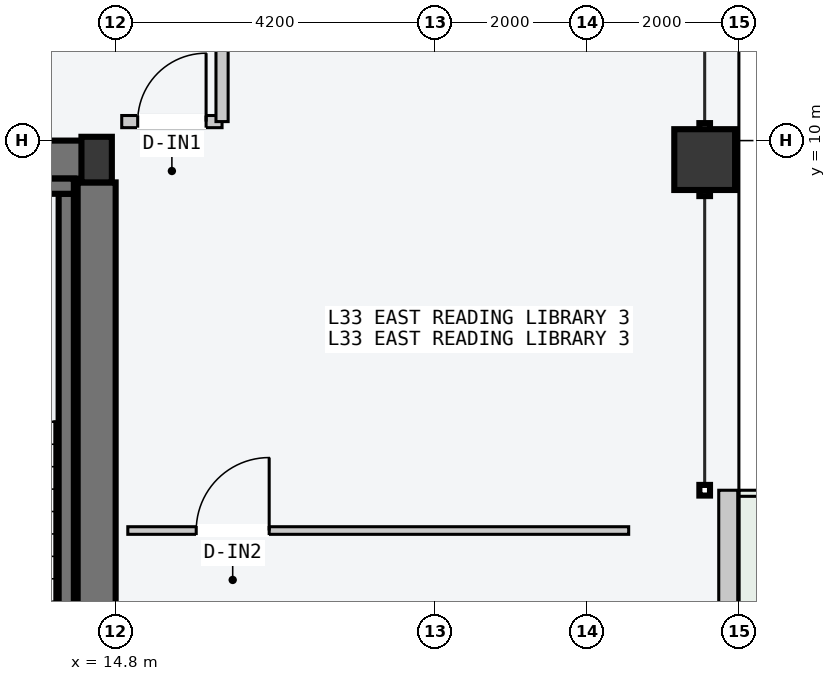
"""IFC4 building model, lengths in metres.
Left out: names, types, materials, properties, quantities, classifications, styles, units other than length and angle.
Written with IfcOpenShell. Run it as: python <this file> out.ifc"""

import sys

from ifc_helpers import new_model, si_unit, direction, frame, frame_2d, origin, origin_2d, place, context, subcontext, project, spatial, rectangle, hollow_rectangle, i_section, extrude, element, fill, save


model = new_model("IFC4")
c1 = context("Model", 3, precision=1e-05, world=origin(), true_north=direction((0.0, 1.0)))
c2 = subcontext(c1, "Body", "Model", "MODEL_VIEW")
j1 = project(units=[si_unit("LENGTHUNIT", "METRE"), si_unit("PLANEANGLEUNIT", "RADIAN")], contexts=[c1])
p1 = place(None, origin())
s1 = spatial("IfcSite", under=j1, at=p1, CompositionType="ELEMENT")
p2 = place(p1, origin())
s2 = spatial("IfcBuilding", under=s1, at=p2, CompositionType="ELEMENT")
p3 = place(p2, frame((0.0, 0.0, 127.8)))
s3 = spatial("IfcBuildingStorey", under=s2, at=p3, CompositionType="ELEMENT", Elevation=127.8)
p4 = place(p3, frame((8.07, 9.75, -0.2), z_axis=(0.0, 0.0, 1.0), x_axis=(1.0, 0.0, 0.0)))
e1 = element("IfcWall", 1, at=p4, inside=s3, PredefinedType="SHEAR", context=c2, shape_type="SweptSolid", body=[
    extrude(rectangle(XDim=6.46, YDim=0.5, at=frame_2d((3.23, 0.0))), origin(), (0.0, 0.0, 1.0), 3.6),
])
p5 = place(p3, frame((14.55, 0.3, -0.2), z_axis=(0.0, 0.0, 1.0), x_axis=(0.0, 1.0, 0.0)))
e2 = element("IfcWall", 2, at=p5, inside=s3, PredefinedType="SHEAR", context=c2, shape_type="SweptSolid", body=[
    extrude(rectangle(XDim=9.15, YDim=0.5, at=frame_2d((4.575, 0.0))), origin(), (0.0, 0.0, 1.0), 3.6),
])
p6 = place(p3, frame((14.15, 1.5, -0.2), z_axis=(0.0, 0.0, 1.0), x_axis=(0.0, 1.0, 0.0)))
e3 = element("IfcWall", 3, at=p6, inside=s3, PredefinedType="SOLIDWALL", context=c2, shape_type="SweptSolid", body=[
    extrude(rectangle(XDim=7.8, YDim=0.2, at=frame_2d((3.9, 0.0))), origin(), (0.0, 0.0, 1.0), 3.6),
])
p7 = place(p3, frame((10.15, 9.4, -0.2), z_axis=(0.0, 0.0, 1.0), x_axis=(1.0, 0.0, 0.0)))
e4 = element("IfcWall", 4, at=p7, inside=s3, PredefinedType="SOLIDWALL", context=c2, shape_type="SweptSolid", body=[
    extrude(rectangle(XDim=4.1, YDim=0.2, at=frame_2d((2.05, 0.0))), origin(), (0.0, 0.0, 1.0), 3.6),
])
p8 = place(p3, frame((14.55, 9.75, 0.0), z_axis=(0.0, 0.0, 1.0), x_axis=(1.0, 0.0, 0.0)))
e5 = element("IfcColumn", 5, at=p8, inside=s3, PredefinedType="COLUMN", context=c2, shape_type="SweptSolid", body=[
    extrude(i_section(OverallWidth=0.4, OverallDepth=0.6, WebThickness=0.022, FlangeThickness=0.036, at=origin_2d()), origin(), (0.0, 0.0, 1.0), 3.6),
])
p9 = place(p3, frame((22.55, 9.75, 0.0), z_axis=(0.0, 0.0, 1.0), x_axis=(0.0, 1.0, 0.0)))
e6 = element("IfcColumn", 6, at=p9, inside=s3, PredefinedType="COLUMN", context=c2, shape_type="SweptSolid", body=[
    extrude(hollow_rectangle(XDim=0.8, YDim=0.8, WallThickness=0.036, at=origin_2d()), origin(), (0.0, 0.0, 1.0), 3.6),
])
p10 = place(p3, frame((22.86, -5.4, 0.0), z_axis=(0.0, 0.0, 1.0), x_axis=(0.0, 1.0, 0.0)))
e7 = element("IfcWall", 7, at=p10, inside=s3, PredefinedType="STANDARD", context=c2, shape_type="SweptSolid", body=[
    extrude(rectangle(XDim=10.8, YDim=0.25, at=frame_2d((5.4, 0.0))), origin(), (0.0, 0.0, 1.0), 3.4),
])
p11 = place(p10, frame((7.2, 0.0, 0.0)))
e8 = element("IfcOpeningElement", 8, at=p11, cuts=e7, PredefinedType="OPENING", context=c2, shape_type="SweptSolid", body=[
    extrude(rectangle(XDim=1.6, YDim=2.2, at=frame_2d((0.8, 1.1))), frame((0.0, 0.135, 0.0), z_axis=(0.0, -1.0, 0.0), x_axis=(1.0, 0.0, 0.0)), (0.0, 0.0, 1.0), 0.27),
])
p12 = place(p10, frame((1.8, 0.0, 0.85)))
e9 = element("IfcOpeningElement", 9, at=p12, cuts=e7, PredefinedType="OPENING", context=c2, shape_type="SweptSolid", body=[
    extrude(rectangle(XDim=2.0, YDim=2.1, at=frame_2d((1.0, 1.05))), frame((0.0, 0.135, 0.0), z_axis=(0.0, -1.0, 0.0), x_axis=(1.0, 0.0, 0.0)), (0.0, 0.0, 1.0), 0.27),
])
p13 = place(p3, frame((14.88, 10.25, 0.0), z_axis=(0.0, 0.0, 1.0), x_axis=(1.0, 0.0, 0.0)))
e10 = element("IfcWall", 10, at=p13, inside=s3, PredefinedType="PARTITIONING", context=c2, shape_type="SweptSolid", body=[
    extrude(rectangle(XDim=1.32, YDim=0.16, at=frame_2d((0.66, 0.0))), origin(), (0.0, 0.0, 1.0), 3.4),
])
p14 = place(p13, frame((0.21, 0.0, 0.0)))
e11 = element("IfcOpeningElement", 11, at=p14, cuts=e10, PredefinedType="OPENING", context=c2, shape_type="SweptSolid", body=[
    extrude(rectangle(XDim=0.9, YDim=2.15, at=frame_2d((0.45, 1.075))), frame((0.0, 0.09, 0.0), z_axis=(0.0, -1.0, 0.0), x_axis=(1.0, 0.0, 0.0)), (0.0, 0.0, 1.0), 0.18),
])
p15 = place(p3, frame((16.2, 10.25, 0.0), z_axis=(0.0, 0.0, 1.0), x_axis=(0.0, 1.0, 0.0)))
e12 = element("IfcWall", 12, at=p15, inside=s3, PredefinedType="PARTITIONING", context=c2, shape_type="SweptSolid", body=[
    extrude(rectangle(XDim=1.95, YDim=0.16, at=frame_2d((0.975, 0.0))), origin(), (0.0, 0.0, 1.0), 3.4),
])
p16 = place(p3, frame((14.96, 4.87, 0.0), z_axis=(0.0, 0.0, 1.0), x_axis=(1.0, 0.0, 0.0)))
e13 = element("IfcWall", 13, at=p16, inside=s3, PredefinedType="PARTITIONING", context=c2, shape_type="SweptSolid", body=[
    extrude(rectangle(XDim=6.59, YDim=0.1, at=frame_2d((3.295, 0.0))), origin(), (0.0, 0.0, 1.0), 3.4),
])
p17 = place(p16, frame((0.9, 0.0, 0.0)))
e14 = element("IfcOpeningElement", 14, at=p17, cuts=e13, PredefinedType="OPENING", context=c2, shape_type="SweptSolid", body=[
    extrude(rectangle(XDim=0.96, YDim=2.18, at=frame_2d((0.48, 1.09))), frame((0.0, 0.06, 0.0), z_axis=(0.0, -1.0, 0.0), x_axis=(1.0, 0.0, 0.0)), (0.0, 0.0, 1.0), 0.12),
])
p18 = place(p14, origin())
e15 = element("IfcDoor", 15, at=p18, inside=s3, OperationType="SINGLE_SWING_RIGHT", PredefinedType="DOOR", context=c2, shape_type="SweptSolid", body=[
    extrude(rectangle(XDim=0.9, YDim=2.15, at=frame_2d((0.45, 1.075))), frame((0.0, 0.025, 0.0), z_axis=(0.0, -1.0, 0.0), x_axis=(1.0, 0.0, 0.0)), (0.0, 0.0, 1.0), 0.05),
])
fill(e11, e15)
p19 = place(p17, origin())
e16 = element("IfcDoor", 16, at=p19, inside=s3, OperationType="SINGLE_SWING_RIGHT", PredefinedType="DOOR", context=c2, shape_type="SweptSolid", body=[
    extrude(rectangle(XDim=0.96, YDim=2.18, at=frame_2d((0.48, 1.09))), frame((0.0, 0.025, 0.0), z_axis=(0.0, -1.0, 0.0), x_axis=(1.0, 0.0, 0.0)), (0.0, 0.0, 1.0), 0.05),
])
fill(e14, e16)
save(model, sys.argv[1])
